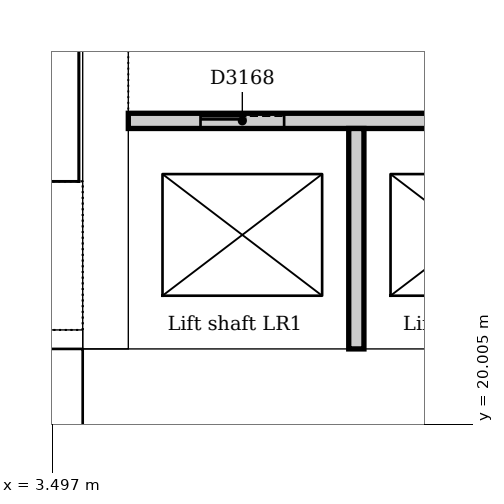
"""IFC4 building model, lengths in metres.
Left out: names, types, materials, properties, quantities, classifications, styles, units other than length and angle.
Written with IfcOpenShell. Run it as: python <this file> out.ifc"""

import sys

from ifc_helpers import new_model, si_unit, direction, frame, frame_2d, origin, place, context, subcontext, project, spatial, rectangle, extrude, element, fill, save


model = new_model("IFC4")
c1 = context("Model", 3, precision=1e-05, world=origin(), true_north=direction((0.0, 1.0)))
c2 = subcontext(c1, "Body", "Model", "MODEL_VIEW")
j1 = project(units=[si_unit("LENGTHUNIT", "METRE"), si_unit("PLANEANGLEUNIT", "RADIAN")], contexts=[c1])
p1 = place(None, origin())
s1 = spatial("IfcSite", under=j1, at=p1, CompositionType="ELEMENT")
p2 = place(p1, origin())
s2 = spatial("IfcBuilding", under=s1, at=p2, CompositionType="ELEMENT")
p3 = place(p2, frame((0.0, 0.0, 21.0)))
s3 = spatial("IfcBuildingStorey", under=s2, at=p3, CompositionType="ELEMENT", Elevation=21.0)
p4 = place(p3, frame((3.9, 20.4, 0.0), z_axis=(0.0, 0.0, 1.0), x_axis=(1.0, 0.0, 0.0)))
e1 = element("IfcWall", 1, at=p4, inside=s3, PredefinedType="SOLIDWALL", context=c2, shape_type="SweptSolid", body=[
    extrude(rectangle(XDim=19.8, YDim=1.2, at=frame_2d((9.9, 0.0))), origin(), (0.0, 0.0, 1.0), 5.0),
])
p5 = place(p3, frame((4.2, 31.5, 0.0), z_axis=(0.0, 0.0, 1.0), x_axis=(0.0, -1.0, 0.0)))
e2 = element("IfcWall", 2, at=p5, inside=s3, PredefinedType="SOLIDWALL", context=c2, shape_type="SweptSolid", body=[
    extrude(rectangle(XDim=10.5, YDim=0.6, at=frame_2d((5.25, 0.0))), origin(), (0.0, 0.0, 1.0), 5.0),
])
p6 = place(p5, frame((4.25, 0.0, 0.0)))
e3 = element("IfcOpeningElement", 3, at=p6, cuts=e2, PredefinedType="OPENING", context=c2, shape_type="SweptSolid", body=[
    extrude(rectangle(XDim=1.0, YDim=2.1, at=frame_2d((0.5, 1.05))), frame((0.0, 0.31, 0.0), z_axis=(0.0, -1.0, 0.0), x_axis=(1.0, 0.0, 0.0)), (0.0, 0.0, 1.0), 0.62),
])
p7 = place(p3, frame((0.36, 21.125, 0.0), z_axis=(0.0, 0.0, 1.0), x_axis=(1.0, 0.0, 0.0)))
e4 = element("IfcWall", 4, at=p7, inside=s3, PredefinedType="SOLIDWALL", context=c2, shape_type="SweptSolid", body=[
    extrude(rectangle(XDim=3.54, YDim=0.25, at=frame_2d((1.77, 0.0))), origin(), (0.0, 0.0, 1.0), 5.0),
])
p8 = place(p3, frame((4.5, 24.0, 0.0), z_axis=(0.0, 0.0, 1.0), x_axis=(1.0, 0.0, 0.0)))
e5 = element("IfcWall", 5, at=p8, inside=s3, PredefinedType="PARTITIONING", context=c2, shape_type="SweptSolid", body=[
    extrude(rectangle(XDim=18.0, YDim=0.2, at=frame_2d((9.0, 0.0))), origin(), (0.0, 0.0, 1.0), 4.85),
])
p9 = place(p8, frame((0.95, 0.0, 0.0)))
e6 = element("IfcOpeningElement", 6, at=p9, cuts=e5, PredefinedType="OPENING", context=c2, shape_type="SweptSolid", body=[
    extrude(rectangle(XDim=1.1, YDim=2.1, at=frame_2d((0.55, 1.05))), frame((0.0, 0.11, 0.0), z_axis=(0.0, -1.0, 0.0), x_axis=(1.0, 0.0, 0.0)), (0.0, 0.0, 1.0), 0.22),
])
p10 = place(p8, frame((3.95, 0.0, 0.0)))
e7 = element("IfcOpeningElement", 7, at=p10, cuts=e5, PredefinedType="OPENING", context=c2, shape_type="SweptSolid", body=[
    extrude(rectangle(XDim=1.1, YDim=2.1, at=frame_2d((0.55, 1.05))), frame((0.0, 0.11, 0.0), z_axis=(0.0, -1.0, 0.0), x_axis=(1.0, 0.0, 0.0)), (0.0, 0.0, 1.0), 0.22),
])
p11 = place(p8, frame((6.95, 0.0, 0.0)))
e8 = element("IfcOpeningElement", 8, at=p11, cuts=e5, PredefinedType="OPENING", context=c2, shape_type="SweptSolid", body=[
    extrude(rectangle(XDim=1.1, YDim=2.1, at=frame_2d((0.55, 1.05))), frame((0.0, 0.11, 0.0), z_axis=(0.0, -1.0, 0.0), x_axis=(1.0, 0.0, 0.0)), (0.0, 0.0, 1.0), 0.22),
])
p12 = place(p8, frame((9.95, 0.0, 0.0)))
e9 = element("IfcOpeningElement", 9, at=p12, cuts=e5, PredefinedType="OPENING", context=c2, shape_type="SweptSolid", body=[
    extrude(rectangle(XDim=1.1, YDim=2.1, at=frame_2d((0.55, 1.05))), frame((0.0, 0.11, 0.0), z_axis=(0.0, -1.0, 0.0), x_axis=(1.0, 0.0, 0.0)), (0.0, 0.0, 1.0), 0.22),
])
p13 = place(p8, frame((12.95, 0.0, 0.0)))
e10 = element("IfcOpeningElement", 10, at=p13, cuts=e5, PredefinedType="OPENING", context=c2, shape_type="SweptSolid", body=[
    extrude(rectangle(XDim=1.1, YDim=2.1, at=frame_2d((0.55, 1.05))), frame((0.0, 0.11, 0.0), z_axis=(0.0, -1.0, 0.0), x_axis=(1.0, 0.0, 0.0)), (0.0, 0.0, 1.0), 0.22),
])
p14 = place(p8, frame((15.95, 0.0, 0.0)))
e11 = element("IfcOpeningElement", 11, at=p14, cuts=e5, PredefinedType="OPENING", context=c2, shape_type="SweptSolid", body=[
    extrude(rectangle(XDim=1.1, YDim=2.1, at=frame_2d((0.55, 1.05))), frame((0.0, 0.11, 0.0), z_axis=(0.0, -1.0, 0.0), x_axis=(1.0, 0.0, 0.0)), (0.0, 0.0, 1.0), 0.22),
])
p15 = place(p3, frame((7.5, 21.0, 0.0), z_axis=(0.0, 0.0, 1.0), x_axis=(0.0, 1.0, 0.0)))
e12 = element("IfcWall", 12, at=p15, inside=s3, PredefinedType="PARTITIONING", context=c2, shape_type="SweptSolid", body=[
    extrude(rectangle(XDim=2.9, YDim=0.2, at=frame_2d((1.45, 0.0))), origin(), (0.0, 0.0, 1.0), 4.85),
])
p16 = place(p9, origin())
e13 = element("IfcDoor", 13, at=p16, inside=s3, OperationType="SLIDING_TO_LEFT", PredefinedType="DOOR", context=c2, shape_type="SweptSolid", body=[
    extrude(rectangle(XDim=1.1, YDim=2.1, at=frame_2d((0.55, 1.05))), frame((0.0, 0.025, 0.0), z_axis=(0.0, -1.0, 0.0), x_axis=(1.0, 0.0, 0.0)), (0.0, 0.0, 1.0), 0.05),
])
fill(e6, e13)
save(model, sys.argv[1])
